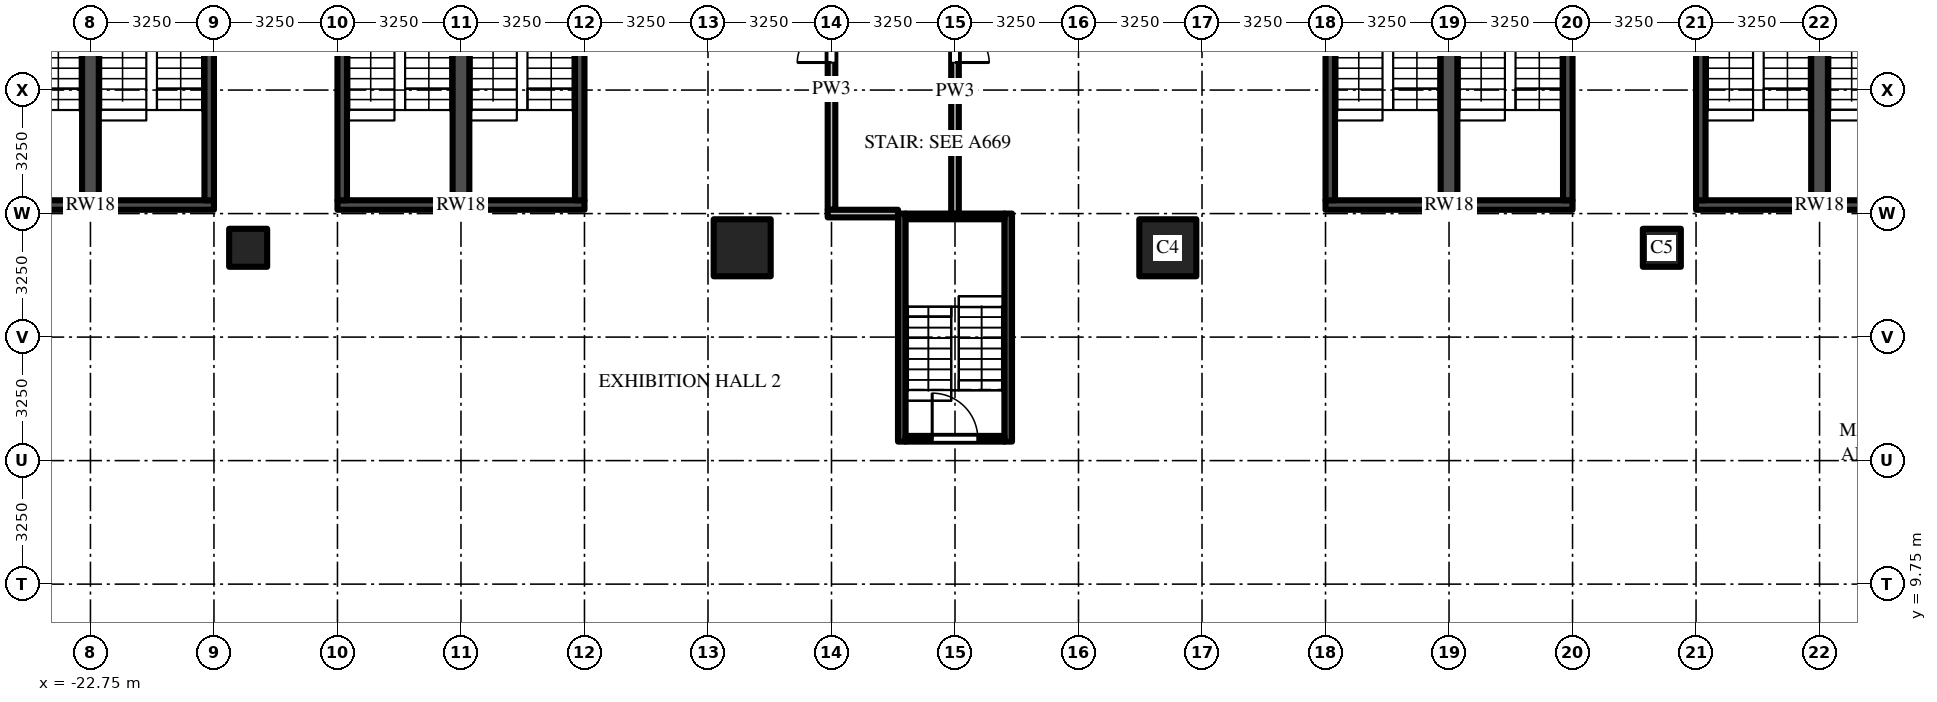
"""IFC4 building model, lengths in metres.
Left out: names, types, materials, properties, quantities, classifications, styles, units other than length and angle.
Written with IfcOpenShell. Run it as: python <this file> out.ifc"""

import sys

from ifc_helpers import new_model, si_unit, direction, frame, frame_2d, origin, origin_2d, place, context, subcontext, project, spatial, rectangle, extrude, source, transform, mapped, element, fill, save


model = new_model("IFC4")
c1 = context("Model", 3, precision=1e-05, world=origin(), true_north=direction((0.0, 1.0)))
c2 = subcontext(c1, "Body", "Model", "MODEL_VIEW")
j1 = project(units=[si_unit("LENGTHUNIT", "METRE"), si_unit("PLANEANGLEUNIT", "RADIAN")], contexts=[c1])
p1 = place(None, origin())
s1 = spatial("IfcSite", under=j1, at=p1, CompositionType="ELEMENT")
p2 = place(p1, origin())
s2 = spatial("IfcBuilding", under=s1, at=p2, CompositionType="ELEMENT")
p3 = place(p2, frame((0.0, 0.0, 24.0)))
s3 = spatial("IfcBuildingStorey", under=s2, at=p3, CompositionType="ELEMENT", Elevation=24.0)
m1 = source(origin(), c2, "Body", "SweptSolid", [
    extrude(rectangle(XDim=1.5, YDim=1.5, at=origin_2d()), origin(), (0.0, 0.0, 1.0), 5.0),
])
p4 = place(p3, frame((5.6, 18.6, 0.0), z_axis=(0.0, 0.0, 1.0), x_axis=(1.0, 0.0, 0.0)))
e1 = element("IfcColumn", 1, at=p4, inside=s3, PredefinedType="COLUMN", context=c2, shape_type="MappedRepresentation", body=[
    mapped(m1, transform((0.0, 0.0, 0.0))),
])
m2 = source(origin(), c2, "Body", "SweptSolid", [
    extrude(rectangle(XDim=1.0, YDim=1.0, at=origin_2d()), origin(), (0.0, 0.0, 1.0), 5.0),
])
p5 = place(p3, frame((18.6, 18.6, 0.0), z_axis=(0.0, 0.0, 1.0), x_axis=(1.0, 0.0, 0.0)))
e2 = element("IfcColumn", 2, at=p5, inside=s3, PredefinedType="COLUMN", context=c2, shape_type="MappedRepresentation", body=[
    mapped(m2, transform((0.0, 0.0, 0.0))),
])
p6 = place(p3, frame((-5.6, 18.6, 0.0), z_axis=(0.0, 0.0, 1.0), x_axis=(1.0, 0.0, 0.0)))
e3 = element("IfcColumn", 3, at=p6, inside=s3, PredefinedType="COLUMN", context=c2, shape_type="MappedRepresentation", body=[
    mapped(m1, transform((0.0, 0.0, 0.0))),
])
p7 = place(p3, frame((-18.6, 18.6, 0.0), z_axis=(0.0, 0.0, 1.0), x_axis=(1.0, 0.0, 0.0)))
e4 = element("IfcColumn", 4, at=p7, inside=s3, PredefinedType="COLUMN", context=c2, shape_type="MappedRepresentation", body=[
    mapped(m2, transform((0.0, 0.0, 0.0))),
])
m3 = source(origin(), c2, "Body", "SweptSolid", [
    extrude(rectangle(XDim=6.0, YDim=0.2, at=frame_2d((3.0, 0.0))), origin(), (0.0, 0.0, 1.0), 4.7),
])
for number, where, z_axis, x_axis in (
    (5, (-1.4, 13.5, 0.0), (0.0, 0.0, 1.0), (0.0, 1.0, 0.0)),
    (6, (1.4, 13.5, 0.0), (0.0, 0.0, 1.0), (0.0, 1.0, 0.0)),
):
    element("IfcWall", number, at=place(p3, frame(where, z_axis=z_axis, x_axis=x_axis)), inside=s3, PredefinedType="SHEAR", context=c2, shape_type="MappedRepresentation", body=[
        mapped(m3, transform((0.0, 0.0, 0.0))),
    ])
m4 = source(origin(), c2, "Body", "SweptSolid", [
    extrude(rectangle(XDim=2.6, YDim=0.15, at=frame_2d((1.3, 0.0))), origin(), (0.0, 0.0, 1.0), 4.7),
])
p8 = place(p3, frame((-1.3, 13.575, 0.0), z_axis=(0.0, 0.0, 1.0), x_axis=(1.0, 0.0, 0.0)))
e7 = element("IfcWall", 7, at=p8, inside=s3, PredefinedType="SHEAR", context=c2, shape_type="MappedRepresentation", body=[
    mapped(m4, transform((0.0, 0.0, 0.0))),
])
m5 = source(origin(), c2, "Body", "SweptSolid", [
    extrude(rectangle(XDim=1.2, YDim=2.1, at=frame_2d((0.6, 1.05))), frame((0.0, 0.085, 0.0), z_axis=(0.0, -1.0, 0.0), x_axis=(1.0, 0.0, 0.0)), (0.0, 0.0, 1.0), 0.17),
])
p9 = place(p8, frame((0.7, 0.0, 0.0)))
e8 = element("IfcOpeningElement", 8, at=p9, cuts=e7, PredefinedType="OPENING", context=c2, shape_type="MappedRepresentation", body=[
    mapped(m5, transform((0.0, 0.0, 0.0))),
])
p10 = place(p3, frame((-1.3, 19.425, 0.0), z_axis=(0.0, 0.0, 1.0), x_axis=(1.0, 0.0, 0.0)))
e9 = element("IfcWall", 9, at=p10, inside=s3, PredefinedType="SHEAR", context=c2, shape_type="MappedRepresentation", body=[
    mapped(m4, transform((0.0, 0.0, 0.0))),
])
m6 = source(origin(), c2, "Body", "SweptSolid", [
    extrude(rectangle(XDim=6.5, YDim=0.25, at=frame_2d((3.25, 0.0))), origin(), (0.0, 0.0, 1.0), 4.7),
])
p11 = place(p3, frame((-26.0, 19.725, 0.0), z_axis=(0.0, 0.0, 1.0), x_axis=(1.0, 0.0, 0.0)))
e10 = element("IfcWall", 10, at=p11, inside=s3, PredefinedType="SHEAR", context=c2, shape_type="MappedRepresentation", body=[
    mapped(m6, transform((0.0, 0.0, 0.0))),
])
m7 = source(origin(), c2, "Body", "SweptSolid", [
    extrude(rectangle(XDim=8.3, YDim=0.25, at=frame_2d((4.15, 0.0))), origin(), (0.0, 0.0, 1.0), 4.7),
])
p12 = place(p3, frame((-19.625, 19.85, 0.0), z_axis=(0.0, 0.0, 1.0), x_axis=(0.0, 1.0, 0.0)))
e11 = element("IfcWall", 11, at=p12, inside=s3, PredefinedType="SHEAR", context=c2, shape_type="MappedRepresentation", body=[
    mapped(m7, transform((0.0, 0.0, 0.0))),
])
m8 = source(origin(), c2, "Body", "SweptSolid", [
    extrude(rectangle(XDim=8.3, YDim=0.44, at=frame_2d((4.15, 0.0))), origin(), (0.0, 0.0, 1.0), 4.7),
])
p13 = place(p3, frame((-22.75, 19.85, 0.0), z_axis=(0.0, 0.0, 1.0), x_axis=(0.0, 1.0, 0.0)))
e12 = element("IfcWall", 12, at=p13, inside=s3, PredefinedType="SHEAR", context=c2, shape_type="MappedRepresentation", body=[
    mapped(m8, transform((0.0, 0.0, 0.0))),
])
p14 = place(p3, frame((-16.25, 19.725, 0.0), z_axis=(0.0, 0.0, 1.0), x_axis=(1.0, 0.0, 0.0)))
e13 = element("IfcWall", 13, at=p14, inside=s3, PredefinedType="SHEAR", context=c2, shape_type="MappedRepresentation", body=[
    mapped(m6, transform((0.0, 0.0, 0.0))),
])
for number, where, z_axis, x_axis in (
    (14, (-16.125, 19.85, 0.0), (0.0, 0.0, 1.0), (0.0, 1.0, 0.0)),
    (15, (-9.875, 19.85, 0.0), (0.0, 0.0, 1.0), (0.0, 1.0, 0.0)),
):
    element("IfcWall", number, at=place(p3, frame(where, z_axis=z_axis, x_axis=x_axis)), inside=s3, PredefinedType="SHEAR", context=c2, shape_type="MappedRepresentation", body=[
        mapped(m7, transform((0.0, 0.0, 0.0))),
    ])
p15 = place(p3, frame((-13.0, 19.85, 0.0), z_axis=(0.0, 0.0, 1.0), x_axis=(0.0, 1.0, 0.0)))
e16 = element("IfcWall", 16, at=p15, inside=s3, PredefinedType="SHEAR", context=c2, shape_type="MappedRepresentation", body=[
    mapped(m8, transform((0.0, 0.0, 0.0))),
])
p16 = place(p3, frame((9.75, 19.725, 0.0), z_axis=(0.0, 0.0, 1.0), x_axis=(1.0, 0.0, 0.0)))
e17 = element("IfcWall", 17, at=p16, inside=s3, PredefinedType="SHEAR", context=c2, shape_type="MappedRepresentation", body=[
    mapped(m6, transform((0.0, 0.0, 0.0))),
])
for number, where, z_axis, x_axis in (
    (18, (9.875, 19.85, 0.0), (0.0, 0.0, 1.0), (0.0, 1.0, 0.0)),
    (19, (16.125, 19.85, 0.0), (0.0, 0.0, 1.0), (0.0, 1.0, 0.0)),
):
    element("IfcWall", number, at=place(p3, frame(where, z_axis=z_axis, x_axis=x_axis)), inside=s3, PredefinedType="SHEAR", context=c2, shape_type="MappedRepresentation", body=[
        mapped(m7, transform((0.0, 0.0, 0.0))),
    ])
p17 = place(p3, frame((13.0, 19.85, 0.0), z_axis=(0.0, 0.0, 1.0), x_axis=(0.0, 1.0, 0.0)))
e20 = element("IfcWall", 20, at=p17, inside=s3, PredefinedType="SHEAR", context=c2, shape_type="MappedRepresentation", body=[
    mapped(m8, transform((0.0, 0.0, 0.0))),
])
p18 = place(p3, frame((19.5, 19.725, 0.0), z_axis=(0.0, 0.0, 1.0), x_axis=(1.0, 0.0, 0.0)))
e21 = element("IfcWall", 21, at=p18, inside=s3, PredefinedType="SHEAR", context=c2, shape_type="MappedRepresentation", body=[
    mapped(m6, transform((0.0, 0.0, 0.0))),
])
p19 = place(p3, frame((19.625, 19.85, 0.0), z_axis=(0.0, 0.0, 1.0), x_axis=(0.0, 1.0, 0.0)))
e22 = element("IfcWall", 22, at=p19, inside=s3, PredefinedType="SHEAR", context=c2, shape_type="MappedRepresentation", body=[
    mapped(m7, transform((0.0, 0.0, 0.0))),
])
p20 = place(p3, frame((22.75, 19.85, 0.0), z_axis=(0.0, 0.0, 1.0), x_axis=(0.0, 1.0, 0.0)))
e23 = element("IfcWall", 23, at=p20, inside=s3, PredefinedType="SHEAR", context=c2, shape_type="MappedRepresentation", body=[
    mapped(m8, transform((0.0, 0.0, 0.0))),
])
m9 = source(origin(), c2, "Body", "SweptSolid", [
    extrude(rectangle(XDim=3.188, YDim=0.2, at=frame_2d((1.594, 0.0))), origin(), (0.0, 0.0, 1.0), 4.7),
])
p21 = place(p3, frame((-3.25, 22.75, 0.0), z_axis=(0.0, 0.0, 1.0), x_axis=(0.0, 1.0, 0.0)))
e24 = element("IfcWall", 24, at=p21, inside=s3, PredefinedType="PARTITIONING", context=c2, shape_type="MappedRepresentation", body=[
    mapped(m9, transform((0.0, 0.0, 0.0))),
])
m10 = source(origin(), c2, "Body", "SweptSolid", [
    extrude(rectangle(XDim=1.8, YDim=2.1, at=frame_2d((0.9, 1.05))), frame((0.0, 0.11, 0.0), z_axis=(0.0, -1.0, 0.0), x_axis=(1.0, 0.0, 0.0)), (0.0, 0.0, 1.0), 0.22),
])
p22 = place(p21, frame((0.725, 0.0, 0.0)))
e25 = element("IfcOpeningElement", 25, at=p22, cuts=e24, PredefinedType="OPENING", context=c2, shape_type="MappedRepresentation", body=[
    mapped(m10, transform((0.0, 0.0, 0.0))),
])
m11 = source(origin(), c2, "Body", "SweptSolid", [
    extrude(rectangle(XDim=3.15, YDim=0.2, at=frame_2d((1.575, 0.0))), origin(), (0.0, 0.0, 1.0), 4.7),
])
p23 = place(p3, frame((-3.25, 19.6, 0.0), z_axis=(0.0, 0.0, 1.0), x_axis=(0.0, 1.0, 0.0)))
e26 = element("IfcWall", 26, at=p23, inside=s3, PredefinedType="PARTITIONING", context=c2, shape_type="MappedRepresentation", body=[
    mapped(m11, transform((0.0, 0.0, 0.0))),
])
m12 = source(origin(), c2, "Body", "SweptSolid", [
    extrude(rectangle(XDim=3.188, YDim=0.2, at=frame_2d((1.594, 0.0))), origin(), (0.0, 0.0, 1.0), 3.996),
])
p24 = place(p3, frame((0.0, 25.938, 0.0), z_axis=(0.0, 0.0, 1.0), x_axis=(0.0, -1.0, 0.0)))
e27 = element("IfcWall", 27, at=p24, inside=s3, PredefinedType="PARTITIONING", context=c2, shape_type="MappedRepresentation", body=[
    mapped(m12, transform((0.0, 0.0, 0.0))),
])
p25 = place(p24, frame((0.663, 0.0, 0.0)))
e28 = element("IfcOpeningElement", 28, at=p25, cuts=e27, PredefinedType="OPENING", context=c2, shape_type="MappedRepresentation", body=[
    mapped(m10, transform((0.0, 0.0, 0.0))),
])
m13 = source(origin(), c2, "Body", "SweptSolid", [
    extrude(rectangle(XDim=3.25, YDim=0.2, at=frame_2d((1.625, 0.0))), origin(), (0.0, 0.0, 1.0), 3.996),
])
p26 = place(p3, frame((0.0, 19.5, 0.0), z_axis=(0.0, 0.0, 1.0), x_axis=(0.0, 1.0, 0.0)))
e29 = element("IfcWall", 29, at=p26, inside=s3, PredefinedType="PARTITIONING", context=c2, shape_type="MappedRepresentation", body=[
    mapped(m13, transform((0.0, 0.0, 0.0))),
])
m14 = source(origin(), c2, "Body", "SweptSolid", [
    extrude(rectangle(XDim=1.85, YDim=0.2, at=frame_2d((0.925, 0.0))), origin(), (0.0, 0.0, 1.0), 3.996),
])
p27 = place(p3, frame((-1.5, 19.5, 0.0), z_axis=(0.0, 0.0, 1.0), x_axis=(-1.0, 0.0, 0.0)))
e30 = element("IfcWall", 30, at=p27, inside=s3, PredefinedType="PARTITIONING", context=c2, shape_type="MappedRepresentation", body=[
    mapped(m14, transform((0.0, 0.0, 0.0))),
])
m15 = source(origin(), c2, "Body", "SweptSolid", [
    extrude(rectangle(XDim=1.2, YDim=2.1, at=frame_2d((0.6, 1.05))), frame((0.0, 0.025, 0.0), z_axis=(0.0, -1.0, 0.0), x_axis=(1.0, 0.0, 0.0)), (0.0, 0.0, 1.0), 0.05),
])
p28 = place(p9, origin())
e31 = element("IfcDoor", 31, at=p28, inside=s3, OperationType="SINGLE_SWING_LEFT", PredefinedType="DOOR", context=c2, shape_type="MappedRepresentation", body=[
    mapped(m15, transform((0.0, 0.0, 0.0))),
])
fill(e8, e31)
m16 = source(origin(), c2, "Body", "SweptSolid", [
    extrude(rectangle(XDim=1.8, YDim=2.1, at=frame_2d((0.9, 1.05))), frame((0.0, 0.025, 0.0), z_axis=(0.0, -1.0, 0.0), x_axis=(1.0, 0.0, 0.0)), (0.0, 0.0, 1.0), 0.05),
])
p29 = place(p22, origin())
e32 = element("IfcDoor", 32, at=p29, inside=s3, OperationType="DOUBLE_DOOR_SINGLE_SWING", PredefinedType="DOOR", context=c2, shape_type="MappedRepresentation", body=[
    mapped(m16, transform((0.0, 0.0, 0.0))),
])
fill(e25, e32)
p30 = place(p25, origin())
e33 = element("IfcDoor", 33, at=p30, inside=s3, OperationType="DOUBLE_DOOR_SINGLE_SWING", PredefinedType="DOOR", context=c2, shape_type="MappedRepresentation", body=[
    mapped(m16, transform((0.0, 0.0, 0.0))),
])
fill(e28, e33)
save(model, sys.argv[1])
